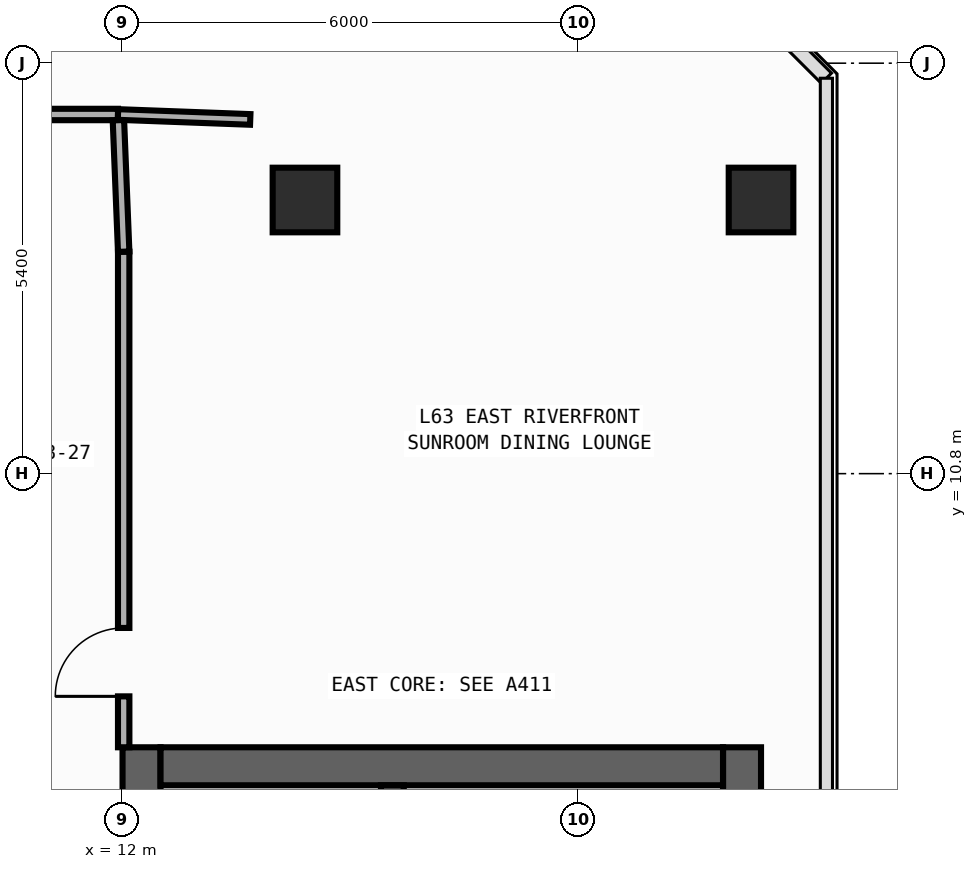
"""IFC4 building model, lengths in metres.
Left out: names, types, materials, properties, quantities, classifications, styles, units other than length and angle.
Written with IfcOpenShell. Run it as: python <this file> out.ifc"""

import sys

from ifc_helpers import new_model, si_unit, direction, frame, frame_2d, origin, origin_2d, place, context, subcontext, project, spatial, rectangle, extrude, element, fill, save


model = new_model("IFC4")
c1 = context("Model", 3, precision=1e-05, world=origin(), true_north=direction((0.0, 1.0)))
c2 = subcontext(c1, "Body", "Model", "MODEL_VIEW")
j1 = project(units=[si_unit("LENGTHUNIT", "METRE"), si_unit("PLANEANGLEUNIT", "RADIAN")], contexts=[c1])
p1 = place(None, origin())
s1 = spatial("IfcSite", under=j1, at=p1, CompositionType="ELEMENT")
p2 = place(p1, origin())
s2 = spatial("IfcBuilding", under=s1, at=p2, CompositionType="ELEMENT")
p3 = place(p2, frame((0.0, 0.0, 265.6)))
s3 = spatial("IfcBuildingStorey", under=s2, at=p3, CompositionType="ELEMENT", Elevation=265.6)
p4 = place(p3, frame((12.25, -19.8, 0.0), z_axis=(0.0, 0.0, 1.0), x_axis=(0.0, 1.0, 0.0)))
e1 = element("IfcWall", 1, at=p4, inside=s3, PredefinedType="SHEAR", context=c2, shape_type="SweptSolid", body=[
    extrude(rectangle(XDim=27.0, YDim=0.5, at=frame_2d((13.5, 0.0))), origin(), (0.0, 0.0, 1.0), 3.34),
])
p5 = place(p4, frame((23.05, 0.0, 0.0)))
e2 = element("IfcOpeningElement", 2, at=p5, cuts=e1, PredefinedType="OPENING", context=c2, shape_type="SweptSolid", body=[
    extrude(rectangle(XDim=1.1, YDim=2.2, at=frame_2d((0.55, 1.1))), frame((0.0, 0.26, 0.0), z_axis=(0.0, -1.0, 0.0), x_axis=(1.0, 0.0, 0.0)), (0.0, 0.0, 1.0), 0.52),
])
p6 = place(p4, frame((19.85, 0.0, 0.0)))
e3 = element("IfcOpeningElement", 3, at=p6, cuts=e1, PredefinedType="OPENING", context=c2, shape_type="SweptSolid", body=[
    extrude(rectangle(XDim=1.1, YDim=2.2, at=frame_2d((0.55, 1.1))), frame((0.0, 0.26, 0.0), z_axis=(0.0, -1.0, 0.0), x_axis=(1.0, 0.0, 0.0)), (0.0, 0.0, 1.0), 0.52),
])
p7 = place(p4, frame((16.65, 0.0, 0.0)))
e4 = element("IfcOpeningElement", 4, at=p7, cuts=e1, PredefinedType="OPENING", context=c2, shape_type="SweptSolid", body=[
    extrude(rectangle(XDim=1.1, YDim=2.2, at=frame_2d((0.55, 1.1))), frame((0.0, 0.26, 0.0), z_axis=(0.0, -1.0, 0.0), x_axis=(1.0, 0.0, 0.0)), (0.0, 0.0, 1.0), 0.52),
])
p8 = place(p4, frame((10.175, 0.0, 0.0)))
e5 = element("IfcOpeningElement", 5, at=p8, cuts=e1, PredefinedType="OPENING", context=c2, shape_type="SweptSolid", body=[
    extrude(rectangle(XDim=0.85, YDim=2.1, at=frame_2d((0.425, 1.05))), frame((0.0, 0.26, 0.0), z_axis=(0.0, -1.0, 0.0), x_axis=(1.0, 0.0, 0.0)), (0.0, 0.0, 1.0), 0.52),
])
p9 = place(p4, frame((12.725, 0.0, 0.0)))
e6 = element("IfcOpeningElement", 6, at=p9, cuts=e1, PredefinedType="OPENING", context=c2, shape_type="SweptSolid", body=[
    extrude(rectangle(XDim=1.15, YDim=2.2, at=frame_2d((0.575, 1.1))), frame((0.0, 0.26, 0.0), z_axis=(0.0, -1.0, 0.0), x_axis=(1.0, 0.0, 0.0)), (0.0, 0.0, 1.0), 0.52),
])
p10 = place(p4, frame((25.125, 0.0, 0.0)))
e7 = element("IfcOpeningElement", 7, at=p10, cuts=e1, PredefinedType="OPENING", context=c2, shape_type="SweptSolid", body=[
    extrude(rectangle(XDim=0.85, YDim=2.1, at=frame_2d((0.425, 1.05))), frame((0.0, 0.26, 0.0), z_axis=(0.0, -1.0, 0.0), x_axis=(1.0, 0.0, 0.0)), (0.0, 0.0, 1.0), 0.52),
])
p11 = place(p3, frame((20.15, -19.8, 0.0), z_axis=(0.0, 0.0, 1.0), x_axis=(0.0, 1.0, 0.0)))
e8 = element("IfcWall", 8, at=p11, inside=s3, PredefinedType="SHEAR", context=c2, shape_type="SweptSolid", body=[
    extrude(rectangle(XDim=27.0, YDim=0.5, at=frame_2d((13.5, 0.0))), origin(), (0.0, 0.0, 1.0), 3.34),
])
p12 = place(p3, frame((12.5, 6.95, 0.0), z_axis=(0.0, 0.0, 1.0), x_axis=(1.0, 0.0, 0.0)))
e9 = element("IfcWall", 9, at=p12, inside=s3, PredefinedType="SHEAR", context=c2, shape_type="SweptSolid", body=[
    extrude(rectangle(XDim=7.4, YDim=0.5, at=frame_2d((3.7, 0.0))), origin(), (0.0, 0.0, 1.0), 3.34),
])
p13 = place(p3, frame((15.55, -19.3, 0.0), z_axis=(0.0, 0.0, 1.0), x_axis=(0.0, 1.0, 0.0)))
e10 = element("IfcWall", 10, at=p13, inside=s3, PredefinedType="SHEAR", context=c2, shape_type="SweptSolid", body=[
    extrude(rectangle(XDim=26.0, YDim=0.3, at=frame_2d((13.0, 0.0))), origin(), (0.0, 0.0, 1.0), 3.34),
])
p14 = place(p13, frame((12.225, 0.0, 0.0)))
e11 = element("IfcOpeningElement", 11, at=p14, cuts=e10, PredefinedType="OPENING", context=c2, shape_type="SweptSolid", body=[
    extrude(rectangle(XDim=1.15, YDim=2.2, at=frame_2d((0.575, 1.1))), frame((0.0, 0.16, 0.0), z_axis=(0.0, -1.0, 0.0), x_axis=(1.0, 0.0, 0.0)), (0.0, 0.0, 1.0), 0.32),
])
p15 = place(p13, frame((24.625, 0.0, 0.0)))
e12 = element("IfcOpeningElement", 12, at=p15, cuts=e10, PredefinedType="OPENING", context=c2, shape_type="SweptSolid", body=[
    extrude(rectangle(XDim=0.85, YDim=2.1, at=frame_2d((0.425, 1.05))), frame((0.0, 0.16, 0.0), z_axis=(0.0, -1.0, 0.0), x_axis=(1.0, 0.0, 0.0)), (0.0, 0.0, 1.0), 0.32),
])
for number, where, z_axis, x_axis in (
    (13, (20.4, 14.4, 0.0), (0.0, 0.0, 1.0), (1.0, 0.0, 0.0)),
    (14, (14.4, 14.4, 0.0), (0.0, 0.0, 1.0), (1.0, 0.0, 0.0)),
):
    element("IfcColumn", number, at=place(p3, frame(where, z_axis=z_axis, x_axis=x_axis)), inside=s3, PredefinedType="COLUMN", context=c2, shape_type="SweptSolid", body=[
        extrude(rectangle(XDim=0.85, YDim=0.85, at=origin_2d()), origin(), (0.0, 0.0, 1.0), 3.6),
    ])
p16 = place(p3, frame((12.015, 7.2, 0.0), z_axis=(0.0, 0.0, 1.0), x_axis=(0.0, 1.0, 0.0)))
e15 = element("IfcWall", 15, at=p16, inside=s3, PredefinedType="PARTITIONING", context=c2, shape_type="SweptSolid", body=[
    extrude(rectangle(XDim=6.52, YDim=0.15, at=frame_2d((3.26, 0.0))), origin(), (0.0, 0.0, 1.0), 3.34),
])
p17 = place(p16, frame((0.67, 0.0, 0.0)))
e16 = element("IfcOpeningElement", 16, at=p17, cuts=e15, PredefinedType="OPENING", context=c2, shape_type="SweptSolid", body=[
    extrude(rectangle(XDim=0.9, YDim=2.15, at=frame_2d((0.45, 1.075))), frame((0.0, 0.085, 0.0), z_axis=(0.0, -1.0, 0.0), x_axis=(1.0, 0.0, 0.0)), (0.0, 0.0, 1.0), 0.17),
])
p18 = place(p3, frame((3.855, 15.525, 0.0), z_axis=(0.0, 0.0, 1.0), x_axis=(1.0, 0.0, 0.0)))
e17 = element("IfcWall", 17, at=p18, inside=s3, PredefinedType="PARTITIONING", context=c2, shape_type="SweptSolid", body=[
    extrude(rectangle(XDim=8.085, YDim=0.15, at=frame_2d((4.042, 0.0))), origin(), (0.0, 0.0, 1.0), 3.34),
])
p19 = place(p3, frame((12.015, 13.72, 0.0), z_axis=(0.0, 0.0, 1.0), x_axis=(-0.040046877756, 0.99919780203, 0.0)))
e18 = element("IfcWall", 18, at=p19, inside=s3, PredefinedType="PARTITIONING", context=c2, shape_type="SweptSolid", body=[
    extrude(rectangle(XDim=1.731, YDim=0.15, at=frame_2d((0.866, 0.0))), origin(), (0.0, 0.0, 1.0), 3.34),
])
p20 = place(p3, frame((11.94, 15.525, 0.0), z_axis=(0.0, 0.0, 1.0), x_axis=(0.999304229002, -0.037296888581, 0.0)))
e19 = element("IfcWall", 19, at=p20, inside=s3, PredefinedType="PARTITIONING", context=c2, shape_type="SweptSolid", body=[
    extrude(rectangle(XDim=1.741, YDim=0.14, at=frame_2d((0.871, 0.0))), origin(), (0.0, 0.0, 1.0), 3.34),
])
p21 = place(p17, origin())
e20 = element("IfcDoor", 20, at=p21, inside=s3, OperationType="SINGLE_SWING_LEFT", PredefinedType="DOOR", context=c2, shape_type="SweptSolid", body=[
    extrude(rectangle(XDim=0.9, YDim=2.15, at=frame_2d((0.45, 1.075))), frame((0.0, 0.025, 0.0), z_axis=(0.0, -1.0, 0.0), x_axis=(1.0, 0.0, 0.0)), (0.0, 0.0, 1.0), 0.05),
])
fill(e16, e20)
save(model, sys.argv[1])
